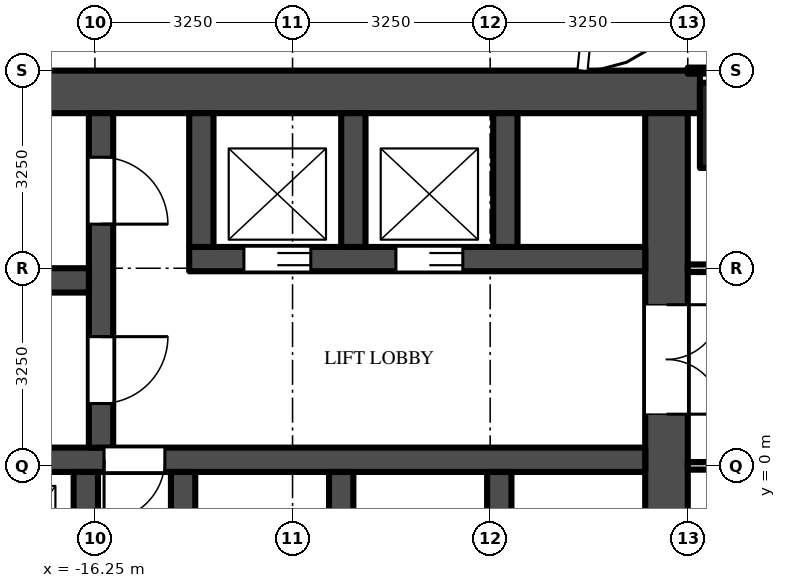
"""IFC4 building model, lengths in metres.
Left out: names, types, materials, properties, quantities, classifications, styles, units other than length and angle.
Written with IfcOpenShell. Run it as: python <this file> out.ifc"""

import sys

from ifc_helpers import new_model, si_unit, direction, frame, frame_2d, origin, origin_2d, place, context, subcontext, project, spatial, rectangle, extrude, source, transform, mapped, element, fill, save


model = new_model("IFC4")
c1 = context("Model", 3, precision=1e-05, world=origin(), true_north=direction((0.0, 1.0)))
c2 = subcontext(c1, "Body", "Model", "MODEL_VIEW")
j1 = project(units=[si_unit("LENGTHUNIT", "METRE"), si_unit("PLANEANGLEUNIT", "RADIAN")], contexts=[c1])
p1 = place(None, origin())
s1 = spatial("IfcSite", under=j1, at=p1, CompositionType="ELEMENT")
p2 = place(p1, origin())
s2 = spatial("IfcBuilding", under=s1, at=p2, CompositionType="ELEMENT")
p3 = place(p2, frame((0.0, 0.0, 65.5)))
s3 = spatial("IfcBuildingStorey", under=s2, at=p3, CompositionType="ELEMENT", Elevation=65.5)
m1 = source(origin(), c2, "Body", "SweptSolid", [
    extrude(rectangle(XDim=1.4, YDim=1.4, at=origin_2d()), origin(), (0.0, 0.0, 1.0), 4.5),
])
p4 = place(p3, frame((-5.6, 5.6, 0.0), z_axis=(0.0, 0.0, 1.0), x_axis=(1.0, 0.0, 0.0)))
e1 = element("IfcColumn", 1, at=p4, inside=s3, PredefinedType="COLUMN", context=c2, shape_type="MappedRepresentation", body=[
    mapped(m1, transform((0.0, 0.0, 0.0))),
])
m2 = source(origin(), c2, "Body", "SweptSolid", [
    extrude(rectangle(XDim=16.45, YDim=0.7, at=frame_2d((8.225, 0.0))), origin(), (0.0, 0.0, 1.0), 4.25),
])
p5 = place(p3, frame((-6.3, 6.15, 0.0), z_axis=(0.0, 0.0, 1.0), x_axis=(-1.0, 0.0, 0.0)))
e2 = element("IfcWall", 2, at=p5, inside=s3, PredefinedType="SHEAR", context=c2, shape_type="MappedRepresentation", body=[
    mapped(m2, transform((0.0, 0.0, 0.0))),
])
m3 = source(origin(), c2, "Body", "SweptSolid", [
    extrude(rectangle(XDim=9.05, YDim=0.7, at=frame_2d((4.525, 0.0))), origin(), (0.0, 0.0, 1.0), 4.25),
])
p6 = place(p3, frame((-6.85, 5.8, 0.0), z_axis=(0.0, 0.0, 1.0), x_axis=(0.0, -1.0, 0.0)))
e3 = element("IfcWall", 3, at=p6, inside=s3, PredefinedType="SHEAR", context=c2, shape_type="MappedRepresentation", body=[
    mapped(m3, transform((0.0, 0.0, 0.0))),
])
m4 = source(origin(), c2, "Body", "SweptSolid", [
    extrude(rectangle(XDim=1.8, YDim=2.1, at=frame_2d((0.9, 1.05))), frame((0.0, 0.36, 0.0), z_axis=(0.0, -1.0, 0.0), x_axis=(1.0, 0.0, 0.0)), (0.0, 0.0, 1.0), 0.72),
])
p7 = place(p6, frame((3.15, 0.0, 0.0)))
e4 = element("IfcOpeningElement", 4, at=p7, cuts=e3, PredefinedType="OPENING", context=c2, shape_type="MappedRepresentation", body=[
    mapped(m4, transform((0.0, 0.0, 0.0))),
])
m5 = source(origin(), c2, "Body", "SweptSolid", [
    extrude(rectangle(XDim=7.5, YDim=0.4, at=frame_2d((3.75, 0.0))), origin(), (0.0, 0.0, 1.0), 4.25),
])
p8 = place(p3, frame((-7.2, 3.4, 0.0), z_axis=(0.0, 0.0, 1.0), x_axis=(-1.0, 0.0, 0.0)))
e5 = element("IfcWall", 5, at=p8, inside=s3, PredefinedType="SHEAR", context=c2, shape_type="MappedRepresentation", body=[
    mapped(m5, transform((0.0, 0.0, 0.0))),
])
m6 = source(origin(), c2, "Body", "SweptSolid", [
    extrude(rectangle(XDim=1.1, YDim=2.1, at=frame_2d((0.55, 1.05))), frame((0.0, 0.21, 0.0), z_axis=(0.0, -1.0, 0.0), x_axis=(1.0, 0.0, 0.0)), (0.0, 0.0, 1.0), 0.42),
])
p9 = place(p8, frame((3.0, 0.0, 0.0)))
e6 = element("IfcOpeningElement", 6, at=p9, cuts=e5, PredefinedType="OPENING", context=c2, shape_type="MappedRepresentation", body=[
    mapped(m6, transform((0.0, 0.0, 0.0))),
])
p10 = place(p8, frame((5.5, 0.0, 0.0)))
e7 = element("IfcOpeningElement", 7, at=p10, cuts=e5, PredefinedType="OPENING", context=c2, shape_type="MappedRepresentation", body=[
    mapped(m6, transform((0.0, 0.0, 0.0))),
])
m7 = source(origin(), c2, "Body", "SweptSolid", [
    extrude(rectangle(XDim=14.85, YDim=0.4, at=frame_2d((7.425, 0.0))), origin(), (0.0, 0.0, 1.0), 4.25),
])
p11 = place(p3, frame((-7.2, 0.1, 0.0), z_axis=(0.0, 0.0, 1.0), x_axis=(-1.0, 0.0, 0.0)))
e8 = element("IfcWall", 8, at=p11, inside=s3, PredefinedType="SHEAR", context=c2, shape_type="MappedRepresentation", body=[
    mapped(m7, transform((0.0, 0.0, 0.0))),
])
m8 = source(origin(), c2, "Body", "SweptSolid", [
    extrude(rectangle(XDim=1.0, YDim=2.1, at=frame_2d((0.5, 1.05))), frame((0.0, 0.21, 0.0), z_axis=(0.0, -1.0, 0.0), x_axis=(1.0, 0.0, 0.0)), (0.0, 0.0, 1.0), 0.42),
])
p12 = place(p11, frame((7.9, 0.0, 0.0)))
e9 = element("IfcOpeningElement", 9, at=p12, cuts=e8, PredefinedType="OPENING", context=c2, shape_type="MappedRepresentation", body=[
    mapped(m8, transform((0.0, 0.0, 0.0))),
])
m9 = source(origin(), c2, "Body", "SweptSolid", [
    extrude(rectangle(XDim=5.5, YDim=0.4, at=frame_2d((2.75, 0.0))), origin(), (0.0, 0.0, 1.0), 4.25),
])
p13 = place(p3, frame((-16.15, 5.8, 0.0), z_axis=(0.0, 0.0, 1.0), x_axis=(0.0, -1.0, 0.0)))
e10 = element("IfcWall", 10, at=p13, inside=s3, PredefinedType="SHEAR", context=c2, shape_type="MappedRepresentation", body=[
    mapped(m9, transform((0.0, 0.0, 0.0))),
])
p14 = place(p13, frame((0.725, 0.0, 0.0)))
e11 = element("IfcOpeningElement", 11, at=p14, cuts=e10, PredefinedType="OPENING", context=c2, shape_type="MappedRepresentation", body=[
    mapped(m6, transform((0.0, 0.0, 0.0))),
])
p15 = place(p13, frame((3.675, 0.0, 0.0)))
e12 = element("IfcOpeningElement", 12, at=p15, cuts=e10, PredefinedType="OPENING", context=c2, shape_type="MappedRepresentation", body=[
    mapped(m6, transform((0.0, 0.0, 0.0))),
])
m10 = source(origin(), c2, "Body", "SweptSolid", [
    extrude(rectangle(XDim=5.7, YDim=0.4, at=frame_2d((2.85, 0.0))), origin(), (0.0, 0.0, 1.0), 4.25),
])
p16 = place(p3, frame((-16.35, 3.05, 0.0), z_axis=(0.0, 0.0, 1.0), x_axis=(-1.0, 0.0, 0.0)))
e13 = element("IfcWall", 13, at=p16, inside=s3, PredefinedType="SHEAR", context=c2, shape_type="MappedRepresentation", body=[
    mapped(m10, transform((0.0, 0.0, 0.0))),
])
m11 = source(origin(), c2, "Body", "SweptSolid", [
    extrude(rectangle(XDim=2.2, YDim=0.4, at=frame_2d((1.1, 0.0))), origin(), (0.0, 0.0, 1.0), 4.25),
])
for number, where, z_axis, x_axis in (
    (14, (-9.5, 5.8, 0.0), (0.0, 0.0, 1.0), (0.0, -1.0, 0.0)),
    (15, (-12.0, 5.8, 0.0), (0.0, 0.0, 1.0), (0.0, -1.0, 0.0)),
    (16, (-14.5, 5.8, 0.0), (0.0, 0.0, 1.0), (0.0, -1.0, 0.0)),
):
    element("IfcWall", number, at=place(p3, frame(where, z_axis=z_axis, x_axis=x_axis)), inside=s3, PredefinedType="SHEAR", context=c2, shape_type="MappedRepresentation", body=[
        mapped(m11, transform((0.0, 0.0, 0.0))),
    ])
m12 = source(origin(), c2, "Body", "SweptSolid", [
    extrude(rectangle(XDim=2.45, YDim=0.4, at=frame_2d((1.225, 0.0))), origin(), (0.0, 0.0, 1.0), 4.25),
])
for number, where, z_axis, x_axis in (
    (17, (-9.6, -0.1, 0.0), (0.0, 0.0, 1.0), (0.0, -1.0, 0.0)),
    (18, (-12.2, -0.1, 0.0), (0.0, 0.0, 1.0), (0.0, -1.0, 0.0)),
    (19, (-14.8, -0.1, 0.0), (0.0, 0.0, 1.0), (0.0, -1.0, 0.0)),
    (20, (-16.4, -0.1, 0.0), (0.0, 0.0, 1.0), (0.0, -1.0, 0.0)),
):
    element("IfcWall", number, at=place(p3, frame(where, z_axis=z_axis, x_axis=x_axis)), inside=s3, PredefinedType="SHEAR", context=c2, shape_type="MappedRepresentation", body=[
        mapped(m12, transform((0.0, 0.0, 0.0))),
    ])
m13 = source(origin(), c2, "Body", "SweptSolid", [
    extrude(rectangle(XDim=5.363, YDim=0.125, at=frame_2d((2.681, 0.0))), origin(), (0.0, 0.0, 1.0), 3.468),
])
p17 = place(p3, frame((-1.137, 0.0, 0.0), z_axis=(0.0, 0.0, 1.0), x_axis=(-1.0, 0.0, 0.0)))
e21 = element("IfcWall", 21, at=p17, inside=s3, PredefinedType="PARTITIONING", context=c2, shape_type="MappedRepresentation", body=[
    mapped(m13, transform((0.0, 0.0, 0.0))),
])
p18 = place(p3, frame((-6.5, 3.25, 0.0), z_axis=(0.0, 0.0, 1.0), x_axis=(1.0, 0.0, 0.0)))
e22 = element("IfcWall", 22, at=p18, inside=s3, PredefinedType="PARTITIONING", context=c2, shape_type="MappedRepresentation", body=[
    mapped(m13, transform((0.0, 0.0, 0.0))),
])
m14 = source(origin(), c2, "Body", "SweptSolid", [
    extrude(rectangle(XDim=1.0, YDim=2.1, at=frame_2d((0.5, 1.05))), frame((0.0, 0.073, 0.0), z_axis=(0.0, -1.0, 0.0), x_axis=(1.0, 0.0, 0.0)), (0.0, 0.0, 1.0), 0.145),
])
p19 = place(p18, frame((1.3, 0.0, 0.0)))
e23 = element("IfcOpeningElement", 23, at=p19, cuts=e22, PredefinedType="OPENING", context=c2, shape_type="MappedRepresentation", body=[
    mapped(m14, transform((0.0, 0.0, 0.0))),
])
m15 = source(origin(), c2, "Body", "SweptSolid", [
    extrude(rectangle(XDim=5.363, YDim=0.1, at=frame_2d((2.681, 0.0))), origin(), (0.0, 0.0, 1.0), 3.33),
])
p20 = place(p3, frame((-6.5, 6.5, 0.0), z_axis=(0.0, 0.0, 1.0), x_axis=(1.0, 0.0, 0.0)))
e24 = element("IfcWall", 24, at=p20, inside=s3, PredefinedType="PARTITIONING", context=c2, shape_type="MappedRepresentation", body=[
    mapped(m15, transform((0.0, 0.0, 0.0))),
])
m16 = source(origin(), c2, "Body", "SweptSolid", [
    extrude(rectangle(XDim=1.1, YDim=2.1, at=frame_2d((0.55, 1.05))), frame((0.0, 0.025, 0.0), z_axis=(0.0, -1.0, 0.0), x_axis=(1.0, 0.0, 0.0)), (0.0, 0.0, 1.0), 0.05),
])
p21 = place(p9, origin())
e25 = element("IfcDoor", 25, at=p21, inside=s3, OperationType="DOUBLE_DOOR_SLIDING", PredefinedType="DOOR", context=c2, shape_type="MappedRepresentation", body=[
    mapped(m16, transform((0.0, 0.0, 0.0))),
])
fill(e6, e25)
p22 = place(p10, origin())
e26 = element("IfcDoor", 26, at=p22, inside=s3, OperationType="DOUBLE_DOOR_SLIDING", PredefinedType="DOOR", context=c2, shape_type="MappedRepresentation", body=[
    mapped(m16, transform((0.0, 0.0, 0.0))),
])
fill(e7, e26)
m17 = source(origin(), c2, "Body", "SweptSolid", [
    extrude(rectangle(XDim=1.8, YDim=2.1, at=frame_2d((0.9, 1.05))), frame((0.0, -0.275, 0.0), z_axis=(0.0, -1.0, 0.0), x_axis=(1.0, 0.0, 0.0)), (0.0, 0.0, 1.0), 0.05),
])
p23 = place(p7, origin())
e27 = element("IfcDoor", 27, at=p23, inside=s3, OperationType="DOUBLE_DOOR_SINGLE_SWING", PredefinedType="DOOR", context=c2, shape_type="MappedRepresentation", body=[
    mapped(m17, transform((0.0, 0.0, 0.0))),
])
fill(e4, e27)
p24 = place(p14, origin())
e28 = element("IfcDoor", 28, at=p24, inside=s3, OperationType="SINGLE_SWING_RIGHT", PredefinedType="DOOR", context=c2, shape_type="MappedRepresentation", body=[
    mapped(m16, transform((0.0, 0.0, 0.0))),
])
fill(e11, e28)
p25 = place(p15, origin())
e29 = element("IfcDoor", 29, at=p25, inside=s3, OperationType="SINGLE_SWING_LEFT", PredefinedType="DOOR", context=c2, shape_type="MappedRepresentation", body=[
    mapped(m16, transform((0.0, 0.0, 0.0))),
])
fill(e12, e29)
m18 = source(origin(), c2, "Body", "SweptSolid", [
    extrude(rectangle(XDim=1.0, YDim=2.1, at=frame_2d((0.5, 1.05))), frame((0.0, 0.025, 0.0), z_axis=(0.0, -1.0, 0.0), x_axis=(1.0, 0.0, 0.0)), (0.0, 0.0, 1.0), 0.05),
])
p26 = place(p12, origin())
e30 = element("IfcDoor", 30, at=p26, inside=s3, OperationType="SINGLE_SWING_RIGHT", PredefinedType="DOOR", context=c2, shape_type="MappedRepresentation", body=[
    mapped(m18, transform((0.0, 0.0, 0.0))),
])
fill(e9, e30)
save(model, sys.argv[1])
